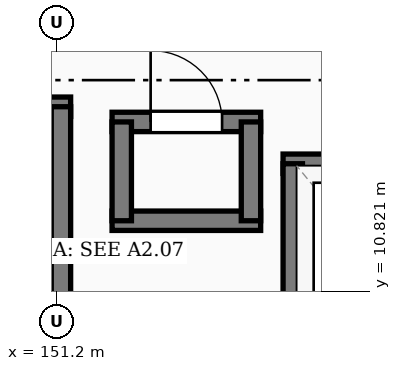
"""IFC4 building model, lengths in metres.
Left out: names, types, materials, properties, quantities, classifications, styles, units other than length and angle.
Written with IfcOpenShell. Run it as: python <this file> out.ifc"""

import sys

from ifc_helpers import new_model, si_unit, direction, frame, frame_2d, origin, place, context, subcontext, project, spatial, rectangle, extrude, element, fill, save


model = new_model("IFC4")
c1 = context("Model", 3, precision=1e-05, world=origin(), true_north=direction((0.0, 1.0)))
c2 = subcontext(c1, "Body", "Model", "MODEL_VIEW")
j1 = project(units=[si_unit("LENGTHUNIT", "METRE"), si_unit("PLANEANGLEUNIT", "RADIAN")], contexts=[c1])
p1 = place(None, origin())
s1 = spatial("IfcSite", under=j1, at=p1, CompositionType="ELEMENT")
p2 = place(p1, origin())
s2 = spatial("IfcBuilding", under=s1, at=p2, CompositionType="ELEMENT")
p3 = place(p2, frame((0.0, 0.0, -7.56)))
s3 = spatial("IfcBuildingStorey", under=s2, at=p3, CompositionType="ELEMENT", Elevation=-7.56)
p4 = place(p3, frame((143.153, 13.25, -0.5), z_axis=(0.0, 0.0, 1.0), x_axis=(1.0, 0.0, 0.0)))
e1 = element("IfcWall", 1, at=p4, inside=s3, PredefinedType="SOLIDWALL", context=c2, shape_type="SweptSolid", body=[
    extrude(rectangle(XDim=8.225, YDim=0.255, at=frame_2d((4.112, 0.0))), origin(), (0.0, 0.0, 1.0), 3.46),
])
p5 = place(p4, frame((0.35, 0.0, 0.5)))
e2 = element("IfcOpeningElement", 2, at=p5, cuts=e1, PredefinedType="OPENING", context=c2, shape_type="SweptSolid", body=[
    extrude(rectangle(XDim=1.25, YDim=2.2, at=frame_2d((0.625, 1.1))), frame((0.0, 0.137, 0.0), z_axis=(0.0, -1.0, 0.0), x_axis=(1.0, 0.0, 0.0)), (0.0, 0.0, 1.0), 0.275),
])
p6 = place(p3, frame((151.25, 9.38, -0.5), z_axis=(0.0, 0.0, 1.0), x_axis=(0.0, 1.0, 0.0)))
e3 = element("IfcWall", 3, at=p6, inside=s3, PredefinedType="SOLIDWALL", context=c2, shape_type="SweptSolid", body=[
    extrude(rectangle(XDim=3.87, YDim=0.255, at=frame_2d((1.935, 0.0))), origin(), (0.0, 0.0, 1.0), 3.46),
])
p7 = place(p3, frame((154.173, 12.5, -0.5), z_axis=(0.0, 0.0, 1.0), x_axis=(1.0, 0.0, 0.0)))
e4 = element("IfcWall", 4, at=p7, inside=s3, PredefinedType="SOLIDWALL", context=c2, shape_type="SweptSolid", body=[
    extrude(rectangle(XDim=2.455, YDim=0.255, at=frame_2d((1.228, 0.0))), origin(), (0.0, 0.0, 1.0), 3.46),
])
p8 = place(p7, frame((0.677, 0.0, 0.5)))
e5 = element("IfcOpeningElement", 5, at=p8, cuts=e4, PredefinedType="OPENING", context=c2, shape_type="SweptSolid", body=[
    extrude(rectangle(XDim=1.1, YDim=2.15, at=frame_2d((0.55, 1.075))), frame((0.0, 0.137, 0.0), z_axis=(0.0, -1.0, 0.0), x_axis=(1.0, 0.0, 0.0)), (0.0, 0.0, 1.0), 0.275),
])
p9 = place(p3, frame((154.3, 9.9, -0.5), z_axis=(0.0, 0.0, 1.0), x_axis=(0.0, 1.0, 0.0)))
e6 = element("IfcWall", 6, at=p9, inside=s3, PredefinedType="SOLIDWALL", context=c2, shape_type="SweptSolid", body=[
    extrude(rectangle(XDim=2.6, YDim=0.255, at=frame_2d((1.3, 0.0))), origin(), (0.0, 0.0, 1.0), 3.46),
])
p10 = place(p3, frame((151.923, 11.75, -0.5), z_axis=(0.0, 0.0, 1.0), x_axis=(1.0, 0.0, 0.0)))
e7 = element("IfcWall", 7, at=p10, inside=s3, PredefinedType="SOLIDWALL", context=c2, shape_type="SweptSolid", body=[
    extrude(rectangle(XDim=1.955, YDim=0.255, at=frame_2d((0.978, 0.0))), origin(), (0.0, 0.0, 1.0), 3.46),
])
p11 = place(p3, frame((151.923, 13.05, -0.5), z_axis=(0.0, 0.0, 1.0), x_axis=(1.0, 0.0, 0.0)))
e8 = element("IfcWall", 8, at=p11, inside=s3, PredefinedType="SOLIDWALL", context=c2, shape_type="SweptSolid", body=[
    extrude(rectangle(XDim=1.955, YDim=0.255, at=frame_2d((0.978, 0.0))), origin(), (0.0, 0.0, 1.0), 3.46),
])
p12 = place(p11, frame((0.508, 0.0, 0.5)))
e9 = element("IfcOpeningElement", 9, at=p12, cuts=e8, PredefinedType="OPENING", context=c2, shape_type="SweptSolid", body=[
    extrude(rectangle(XDim=0.94, YDim=2.1, at=frame_2d((0.47, 1.05))), frame((0.0, 0.137, 0.0), z_axis=(0.0, -1.0, 0.0), x_axis=(1.0, 0.0, 0.0)), (0.0, 0.0, 1.0), 0.275),
])
for number, where, z_axis, x_axis in (
    (10, (152.05, 11.75, -0.5), (0.0, 0.0, 1.0), (0.0, 1.0, 0.0)),
    (11, (153.75, 11.75, -0.5), (0.0, 0.0, 1.0), (0.0, 1.0, 0.0)),
):
    element("IfcWall", number, at=place(p3, frame(where, z_axis=z_axis, x_axis=x_axis)), inside=s3, PredefinedType="SOLIDWALL", context=c2, shape_type="SweptSolid", body=[
        extrude(rectangle(XDim=1.3, YDim=0.255, at=frame_2d((0.65, 0.0))), origin(), (0.0, 0.0, 1.0), 3.46),
    ])
p13 = place(p12, origin())
e12 = element("IfcDoor", 12, at=p13, inside=s3, OperationType="SINGLE_SWING_LEFT", PredefinedType="DOOR", context=c2, shape_type="SweptSolid", body=[
    extrude(rectangle(XDim=0.94, YDim=2.1, at=frame_2d((0.47, 1.05))), frame((0.0, 0.025, 0.0), z_axis=(0.0, -1.0, 0.0), x_axis=(1.0, 0.0, 0.0)), (0.0, 0.0, 1.0), 0.05),
])
fill(e9, e12)
save(model, sys.argv[1])
